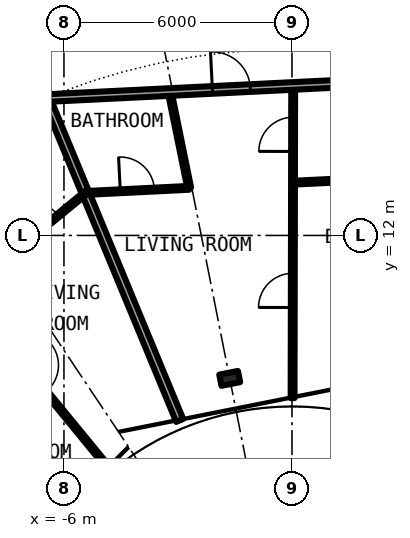
"""IFC4 building model, lengths in metres.
Left out: names, types, materials, properties, quantities, classifications, styles, units other than length and angle.
Written with IfcOpenShell. Run it as: python <this file> out.ifc"""

import sys

from ifc_helpers import new_model, si_unit, direction, frame, frame_2d, origin, origin_2d, place, context, subcontext, project, spatial, rectangle, i_section, extrude, element, fill, save


model = new_model("IFC4")
c1 = context("Model", 3, precision=1e-05, world=origin(), true_north=direction((0.0, 1.0)))
c2 = subcontext(c1, "Body", "Model", "MODEL_VIEW")
j1 = project(units=[si_unit("LENGTHUNIT", "METRE"), si_unit("PLANEANGLEUNIT", "RADIAN")], contexts=[c1])
p1 = place(None, origin())
s1 = spatial("IfcSite", under=j1, at=p1, CompositionType="ELEMENT")
p2 = place(p1, origin())
s2 = spatial("IfcBuilding", under=s1, at=p2, CompositionType="ELEMENT")
p3 = place(p2, frame((0.0, 0.0, 41.1)))
s3 = spatial("IfcBuildingStorey", under=s2, at=p3, CompositionType="ELEMENT", Elevation=41.1)
p4 = place(p3, frame((-1.639, 8.239, 0.0), z_axis=(0.0, 0.0, 1.0), x_axis=(-0.195090322016, 0.980785280403, 0.0)))
e1 = element("IfcColumn", 1, at=p4, inside=s3, PredefinedType="COLUMN", context=c2, shape_type="SweptSolid", body=[
    extrude(i_section(OverallWidth=0.3, OverallDepth=0.5, WebThickness=0.014, FlangeThickness=0.028, FilletRadius=0.027, at=origin_2d()), origin(), (0.0, 0.0, 1.0), 3.05),
])
p5 = place(p3, frame((-8.62, 10.504, 0.0), z_axis=(0.0, 0.0, 1.0), x_axis=(0.634358693064, -0.773038840249, 0.0)))
e2 = element("IfcWall", 2, at=p5, inside=s3, PredefinedType="PARTITIONING", context=c2, shape_type="SweptSolid", body=[
    extrude(rectangle(XDim=5.868, YDim=0.1, at=frame_2d((2.934, 0.0))), origin(), (0.0, 0.0, 1.0), 2.7),
])
p6 = place(p5, frame((2.484, 0.0, 0.0)))
e3 = element("IfcOpeningElement", 3, at=p6, cuts=e2, PredefinedType="OPENING", context=c2, shape_type="SweptSolid", body=[
    extrude(rectangle(XDim=0.9, YDim=2.3, at=frame_2d((0.45, 1.15))), frame((0.0, 0.06, 0.0), z_axis=(0.0, -1.0, 0.0), x_axis=(1.0, 0.0, 0.0)), (0.0, 0.0, 1.0), 0.12),
])
p7 = place(p3, frame((-6.467, 15.614, 0.0), z_axis=(0.0, 0.0, 1.0), x_axis=(0.382556139466, -0.923932248683, 0.0)))
e4 = element("IfcWall", 4, at=p7, inside=s3, PredefinedType="PARTITIONING", context=c2, shape_type="SweptSolid", body=[
    extrude(rectangle(XDim=9.18, YDim=0.2, at=frame_2d((4.59, 0.0))), origin(), (0.0, 0.0, 1.0), 2.7),
])
p8 = place(p3, frame((-3.218, 15.773, 0.0), z_axis=(0.0, 0.0, 1.0), x_axis=(0.199820523641, -0.979832515449, 0.0)))
e5 = element("IfcWall", 5, at=p8, inside=s3, PredefinedType="PARTITIONING", context=c2, shape_type="SweptSolid", body=[
    extrude(rectangle(XDim=2.572, YDim=0.1, at=frame_2d((1.286, 0.0))), origin(), (0.0, 0.0, 1.0), 2.7),
])
p9 = place(p3, frame((0.016, 7.72, 0.0), z_axis=(0.0, 0.0, 1.0), x_axis=(0.0019321625, 0.999998133372, 0.0)))
e6 = element("IfcWall", 6, at=p9, inside=s3, PredefinedType="PARTITIONING", context=c2, shape_type="SweptSolid", body=[
    extrude(rectangle(XDim=8.213, YDim=0.1, at=frame_2d((4.106, 0.0))), origin(), (0.0, 0.0, 1.0), 2.7),
])
p10 = place(p9, frame((6.49, 0.0, 0.0)))
e7 = element("IfcOpeningElement", 7, at=p10, cuts=e6, PredefinedType="OPENING", context=c2, shape_type="SweptSolid", body=[
    extrude(rectangle(XDim=0.9, YDim=2.3, at=frame_2d((0.45, 1.15))), frame((0.0, 0.06, 0.0), z_axis=(0.0, -1.0, 0.0), x_axis=(1.0, 0.0, 0.0)), (0.0, 0.0, 1.0), 0.12),
])
p11 = place(p9, frame((2.384, 0.0, 0.0)))
e8 = element("IfcOpeningElement", 8, at=p11, cuts=e6, PredefinedType="OPENING", context=c2, shape_type="SweptSolid", body=[
    extrude(rectangle(XDim=0.9, YDim=2.3, at=frame_2d((0.45, 1.15))), frame((0.0, 0.06, 0.0), z_axis=(0.0, -1.0, 0.0), x_axis=(1.0, 0.0, 0.0)), (0.0, 0.0, 1.0), 0.12),
])
p12 = place(p3, frame((-5.437, 13.117, 0.0), z_axis=(0.0, 0.0, 1.0), x_axis=(0.998779365748, 0.049394114582, 0.0)))
e9 = element("IfcWall", 9, at=p12, inside=s3, PredefinedType="PARTITIONING", context=c2, shape_type="SweptSolid", body=[
    extrude(rectangle(XDim=2.733, YDim=0.1, at=frame_2d((1.367, 0.0))), origin(), (0.0, 0.0, 1.0), 2.7),
])
p13 = place(p12, frame((0.92, 0.0, 0.0)))
e10 = element("IfcOpeningElement", 10, at=p13, cuts=e9, PredefinedType="OPENING", context=c2, shape_type="SweptSolid", body=[
    extrude(rectangle(XDim=0.9, YDim=2.3, at=frame_2d((0.45, 1.15))), frame((0.0, 0.06, 0.0), z_axis=(0.0, -1.0, 0.0), x_axis=(1.0, 0.0, 0.0)), (0.0, 0.0, 1.0), 0.12),
])
p14 = place(p3, frame((0.027, 13.387, 0.0), z_axis=(0.0, 0.0, 1.0), x_axis=(0.998783768304, 0.049305011635, 0.0)))
e11 = element("IfcWall", 11, at=p14, inside=s3, PredefinedType="PARTITIONING", context=c2, shape_type="SweptSolid", body=[
    extrude(rectangle(XDim=4.1, YDim=0.1, at=frame_2d((2.05, 0.0))), origin(), (0.0, 0.0, 1.0), 2.7),
])
p15 = place(p3, frame((-7.552, 11.379, 0.0), z_axis=(0.0, 0.0, 1.0), x_axis=(0.773323547924, 0.634011585246, 0.0)))
e12 = element("IfcWall", 12, at=p15, inside=s3, PredefinedType="PARTITIONING", context=c2, shape_type="SweptSolid", body=[
    extrude(rectangle(XDim=2.748, YDim=0.1, at=frame_2d((1.374, 0.0))), origin(), (0.0, 0.0, 1.0), 2.7),
])
p16 = place(p15, frame((0.917, 0.0, 0.0)))
e13 = element("IfcOpeningElement", 13, at=p16, cuts=e12, PredefinedType="OPENING", context=c2, shape_type="SweptSolid", body=[
    extrude(rectangle(XDim=0.9, YDim=2.3, at=frame_2d((0.45, 1.15))), frame((0.0, 0.06, 0.0), z_axis=(0.0, -1.0, 0.0), x_axis=(1.0, 0.0, 0.0)), (0.0, 0.0, 1.0), 0.12),
])
p17 = place(p3, frame((-6.472, 15.613, 0.0), z_axis=(0.0, 0.0, 1.0), x_axis=(0.998789903976, 0.049180562371, 0.0)))
e14 = element("IfcWall", 14, at=p17, inside=s3, PredefinedType="PARTITIONING", context=c2, shape_type="SweptSolid", body=[
    extrude(rectangle(XDim=11.388, YDim=0.2, at=frame_2d((5.694, 0.0))), origin(), (0.0, 0.0, 1.0), 2.7),
])
p18 = place(p17, frame((4.383, 0.0, 0.0)))
e15 = element("IfcOpeningElement", 15, at=p18, cuts=e14, PredefinedType="OPENING", context=c2, shape_type="SweptSolid", body=[
    extrude(rectangle(XDim=1.0, YDim=2.3, at=frame_2d((0.5, 1.15))), frame((0.0, 0.11, 0.0), z_axis=(0.0, -1.0, 0.0), x_axis=(1.0, 0.0, 0.0)), (0.0, 0.0, 1.0), 0.22),
])
p19 = place(p3, frame((-10.742, 16.351, 0.0), z_axis=(0.0, 0.0, 1.0), x_axis=(0.941707755593, 0.336432018476, 0.0)))
e16 = element("IfcWall", 16, at=p19, inside=s3, PredefinedType="PARTITIONING", context=c2, shape_type="SweptSolid", body=[
    extrude(rectangle(XDim=9.381, YDim=0.2, at=frame_2d((4.69, 0.0))), origin(), (0.0, 0.0, 1.0), 2.38),
])
p20 = place(p19, frame((4.106, 0.0, 0.0)))
e17 = element("IfcOpeningElement", 17, at=p20, cuts=e16, PredefinedType="OPENING", context=c2, shape_type="SweptSolid", body=[
    extrude(rectangle(XDim=1.0, YDim=2.3, at=frame_2d((0.5, 1.15))), frame((0.0, 0.11, 0.0), z_axis=(0.0, -1.0, 0.0), x_axis=(1.0, 0.0, 0.0)), (0.0, 0.0, 1.0), 0.22),
])
p21 = place(p18, origin())
e18 = element("IfcDoor", 18, at=p21, inside=s3, OperationType="SINGLE_SWING_LEFT", PredefinedType="DOOR", context=c2, shape_type="SweptSolid", body=[
    extrude(rectangle(XDim=1.0, YDim=2.3, at=frame_2d((0.5, 1.15))), frame((0.0, 0.025, 0.0), z_axis=(0.0, -1.0, 0.0), x_axis=(1.0, 0.0, 0.0)), (0.0, 0.0, 1.0), 0.05),
])
fill(e15, e18)
p22 = place(p13, origin())
e19 = element("IfcDoor", 19, at=p22, inside=s3, OperationType="SINGLE_SWING_RIGHT", PredefinedType="DOOR", context=c2, shape_type="SweptSolid", body=[
    extrude(rectangle(XDim=0.9, YDim=2.3, at=frame_2d((0.45, 1.15))), frame((0.0, 0.025, 0.0), z_axis=(0.0, -1.0, 0.0), x_axis=(1.0, 0.0, 0.0)), (0.0, 0.0, 1.0), 0.05),
])
fill(e10, e19)
p23 = place(p10, origin())
e20 = element("IfcDoor", 20, at=p23, inside=s3, OperationType="SINGLE_SWING_RIGHT", PredefinedType="DOOR", context=c2, shape_type="SweptSolid", body=[
    extrude(rectangle(XDim=0.9, YDim=2.3, at=frame_2d((0.45, 1.15))), frame((0.0, 0.025, 0.0), z_axis=(0.0, -1.0, 0.0), x_axis=(1.0, 0.0, 0.0)), (0.0, 0.0, 1.0), 0.05),
])
fill(e7, e20)
p24 = place(p11, origin())
e21 = element("IfcDoor", 21, at=p24, inside=s3, OperationType="SINGLE_SWING_LEFT", PredefinedType="DOOR", context=c2, shape_type="SweptSolid", body=[
    extrude(rectangle(XDim=0.9, YDim=2.3, at=frame_2d((0.45, 1.15))), frame((0.0, 0.025, 0.0), z_axis=(0.0, -1.0, 0.0), x_axis=(1.0, 0.0, 0.0)), (0.0, 0.0, 1.0), 0.05),
])
fill(e8, e21)
p25 = place(p16, origin())
e22 = element("IfcDoor", 22, at=p25, inside=s3, OperationType="SINGLE_SWING_LEFT", PredefinedType="DOOR", context=c2, shape_type="SweptSolid", body=[
    extrude(rectangle(XDim=0.9, YDim=2.3, at=frame_2d((0.45, 1.15))), frame((0.0, 0.025, 0.0), z_axis=(0.0, -1.0, 0.0), x_axis=(1.0, 0.0, 0.0)), (0.0, 0.0, 1.0), 0.05),
])
fill(e13, e22)
save(model, sys.argv[1])
